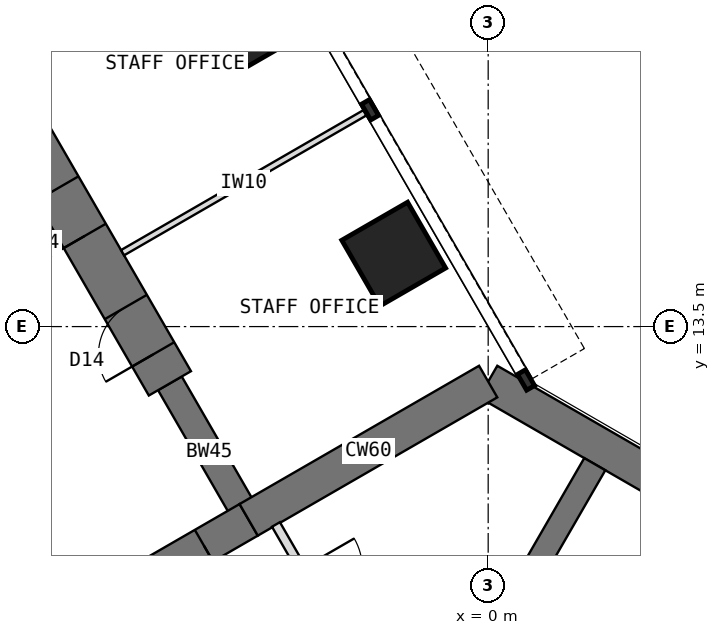
"""IFC4 building model, lengths in metres.
Left out: names, types, materials, properties, quantities, classifications, styles, units other than length and angle.
Written with IfcOpenShell. Run it as: python <this file> out.ifc"""

import sys

from ifc_helpers import new_model, si_unit, direction, frame, frame_2d, origin, origin_2d, place, context, subcontext, project, spatial, rectangle, extrude, element, fill, save


model = new_model("IFC4")
c1 = context("Model", 3, precision=1e-05, world=origin(), true_north=direction((0.0, 1.0)))
c2 = subcontext(c1, "Body", "Model", "MODEL_VIEW")
j1 = project(units=[si_unit("LENGTHUNIT", "METRE"), si_unit("PLANEANGLEUNIT", "RADIAN")], contexts=[c1])
p1 = place(None, origin())
s1 = spatial("IfcSite", under=j1, at=p1, CompositionType="ELEMENT")
p2 = place(p1, origin())
s2 = spatial("IfcBuilding", under=s1, at=p2, CompositionType="ELEMENT")
p3 = place(p2, frame((0.0, 0.0, 161.5)))
s3 = spatial("IfcBuildingStorey", under=s2, at=p3, CompositionType="ELEMENT", Elevation=161.5)
p4 = place(p3, frame((10.908, 6.298, 0.0), z_axis=(0.0, 0.0, 1.0), x_axis=(-0.866021940709, 0.500005998175, 0.0)))
e1 = element("IfcWall", 1, at=p4, inside=s3, PredefinedType="SHEAR", context=c2, shape_type="SweptSolid", body=[
    extrude(rectangle(XDim=12.596, YDim=0.6, at=frame_2d((6.298, 0.0))), origin(), (0.0, 0.0, 1.0), 4.0),
])
p5 = place(p3, frame((0.0, 12.596, 0.0), z_axis=(0.0, 0.0, 1.0), x_axis=(-0.866011268655, -0.500024481964, 0.0)))
e2 = element("IfcWall", 2, at=p5, inside=s3, PredefinedType="SHEAR", context=c2, shape_type="SweptSolid", body=[
    extrude(rectangle(XDim=4.548, YDim=0.6, at=frame_2d((2.274, 0.0))), origin(), (0.0, 0.0, 1.0), 4.0),
])
p6 = place(p3, frame((-3.939, 10.322, 0.0), z_axis=(0.0, 0.0, 1.0), x_axis=(-0.866019471182, -0.500010275428, 0.0)))
e3 = element("IfcWall", 3, at=p6, inside=s3, PredefinedType="SHEAR", context=c2, shape_type="SweptSolid", body=[
    extrude(rectangle(XDim=3.5, YDim=0.6, at=frame_2d((1.75, 0.0))), origin(), (0.0, 0.0, 1.0), 4.0),
])
p7 = place(p6, frame((0.85, 0.0, 0.0)))
e4 = element("IfcOpeningElement", 4, at=p7, cuts=e3, PredefinedType="OPENING", context=c2, shape_type="SweptSolid", body=[
    extrude(rectangle(XDim=1.8, YDim=2.1, at=frame_2d((0.9, 1.05))), frame((0.0, 0.31, 0.0), z_axis=(0.0, -1.0, 0.0), x_axis=(1.0, 0.0, 0.0)), (0.0, 0.0, 1.0), 0.62),
])
for number, where, z_axis, x_axis in (
    (5, (-6.97, 8.572, 0.0), (0.0, 0.0, 1.0), (-0.5, 0.866, 0.0)),
    (6, (-3.939, 10.322, 0.0), (0.0, 0.0, 1.0), (-0.5, 0.866, 0.0)),
):
    element("IfcWall", number, at=place(p3, frame(where, z_axis=z_axis, x_axis=x_axis)), inside=s3, PredefinedType="SHEAR", context=c2, shape_type="SweptSolid", body=[
        extrude(rectangle(XDim=2.592, YDim=0.45, at=frame_2d((1.296, 0.0))), origin(), (0.0, 0.0, 1.0), 4.0),
    ])
p8 = place(p3, frame((-5.234, 12.566, 0.0), z_axis=(0.0, 0.0, 1.0), x_axis=(-0.500010103361, 0.866019570528, 0.0)))
e7 = element("IfcWall", 7, at=p8, inside=s3, PredefinedType="SHEAR", context=c2, shape_type="SweptSolid", body=[
    extrude(rectangle(XDim=13.2, YDim=0.8, at=frame_2d((6.6, 0.0))), origin(), (0.0, 0.0, 1.0), 4.0),
])
p9 = place(p8, frame((0.55, 0.0, 0.0)))
e8 = element("IfcOpeningElement", 8, at=p9, cuts=e7, PredefinedType="OPENING", context=c2, shape_type="SweptSolid", body=[
    extrude(rectangle(XDim=0.9, YDim=2.1, at=frame_2d((0.45, 1.05))), frame((0.0, 0.41, 0.0), z_axis=(0.0, -1.0, 0.0), x_axis=(1.0, 0.0, 0.0)), (0.0, 0.0, 1.0), 0.82),
])
p10 = place(p8, frame((2.8, 0.0, 0.0)))
e9 = element("IfcOpeningElement", 9, at=p10, cuts=e7, PredefinedType="OPENING", context=c2, shape_type="SweptSolid", body=[
    extrude(rectangle(XDim=0.9, YDim=2.1, at=frame_2d((0.45, 1.05))), frame((0.0, 0.41, 0.0), z_axis=(0.0, -1.0, 0.0), x_axis=(1.0, 0.0, 0.0)), (0.0, 0.0, 1.0), 0.82),
])
p11 = place(p8, frame((7.3, 0.0, 0.0)))
e10 = element("IfcOpeningElement", 10, at=p11, cuts=e7, PredefinedType="OPENING", context=c2, shape_type="SweptSolid", body=[
    extrude(rectangle(XDim=0.9, YDim=2.1, at=frame_2d((0.45, 1.05))), frame((0.0, 0.41, 0.0), z_axis=(0.0, -1.0, 0.0), x_axis=(1.0, 0.0, 0.0)), (0.0, 0.0, 1.0), 0.82),
])
for number, where, z_axis, x_axis in (
    (11, (-1.554, 14.691, 0.0), (0.0, 0.0, 1.0), (0.866, 0.5, 0.0)),
    (12, (-3.804, 18.588, 0.0), (0.0, 0.0, 1.0), (0.866, 0.5, 0.0)),
):
    element("IfcColumn", number, at=place(p3, frame(where, z_axis=z_axis, x_axis=x_axis)), inside=s3, PredefinedType="COLUMN", context=c2, shape_type="SweptSolid", body=[
        extrude(rectangle(XDim=1.25, YDim=1.25, at=origin_2d()), origin(), (0.0, 0.0, 1.0), 4.0),
    ])
p12 = place(p3, frame((-1.201, 6.12, 0.0), z_axis=(0.0, 0.0, 1.0), x_axis=(0.49999668571, 0.866027317282, 0.0)))
e13 = element("IfcWall", 13, at=p12, inside=s3, PredefinedType="SHEAR", context=c2, shape_type="SweptSolid", body=[
    extrude(rectangle(XDim=5.908, YDim=0.4, at=frame_2d((2.954, 0.0))), origin(), (0.0, 0.0, 1.0), 4.0),
])
p13 = place(p3, frame((-6.013, 14.715, 0.0), z_axis=(0.0, 0.0, 1.0), x_axis=(0.866016770315, 0.500014953309, 0.0)))
e14 = element("IfcWall", 14, at=p13, inside=s3, PredefinedType="PARTITIONING", context=c2, shape_type="SweptSolid", body=[
    extrude(rectangle(XDim=4.6, YDim=0.1, at=frame_2d((2.3, 0.0))), origin(), (0.0, 0.0, 1.0), 3.7),
])
p14 = place(p3, frame((-3.49, 10.246, 0.0), z_axis=(0.0, 0.0, 1.0), x_axis=(0.499999473313, -0.866025707867, 0.0)))
e15 = element("IfcWall", 15, at=p14, inside=s3, PredefinedType="PARTITIONING", context=c2, shape_type="SweptSolid", body=[
    extrude(rectangle(XDim=4.476, YDim=0.15, at=frame_2d((2.238, 0.0))), origin(), (0.0, 0.0, 1.0), 3.7),
])
p15 = place(p14, frame((0.843, 0.0, 0.0)))
e16 = element("IfcOpeningElement", 16, at=p15, cuts=e15, PredefinedType="OPENING", context=c2, shape_type="SweptSolid", body=[
    extrude(rectangle(XDim=1.0, YDim=2.1, at=frame_2d((0.5, 1.05))), frame((0.0, 0.085, 0.0), z_axis=(0.0, -1.0, 0.0), x_axis=(1.0, 0.0, 0.0)), (0.0, 0.0, 1.0), 0.17),
])
p16 = place(p7, origin())
e17 = element("IfcDoor", 17, at=p16, inside=s3, OperationType="DOUBLE_DOOR_DOUBLE_SWING", PredefinedType="DOOR", context=c2, shape_type="SweptSolid", body=[
    extrude(rectangle(XDim=1.72, YDim=2.06, at=frame_2d((0.9, 1.03))), frame((0.0, 0.025, 0.0), z_axis=(0.0, -1.0, 0.0), x_axis=(1.0, 0.0, 0.0)), (0.0, 0.0, 1.0), 0.05),
    extrude(rectangle(XDim=0.04, YDim=2.1, at=frame_2d((0.02, 1.05))), frame((0.0, 0.3, 0.0), z_axis=(0.0, -1.0, 0.0), x_axis=(1.0, 0.0, 0.0)), (0.0, 0.0, 1.0), 0.6),
    extrude(rectangle(XDim=0.04, YDim=2.1, at=frame_2d((1.78, 1.05))), frame((0.0, 0.3, 0.0), z_axis=(0.0, -1.0, 0.0), x_axis=(1.0, 0.0, 0.0)), (0.0, 0.0, 1.0), 0.6),
    extrude(rectangle(XDim=1.72, YDim=0.04, at=frame_2d((0.9, 2.08))), frame((0.0, 0.3, 0.0), z_axis=(0.0, -1.0, 0.0), x_axis=(1.0, 0.0, 0.0)), (0.0, 0.0, 1.0), 0.6),
])
fill(e4, e17)
p17 = place(p9, origin())
e18 = element("IfcDoor", 18, at=p17, inside=s3, OperationType="SINGLE_SWING_LEFT", PredefinedType="DOOR", context=c2, shape_type="SweptSolid", body=[
    extrude(rectangle(XDim=0.82, YDim=2.06, at=frame_2d((0.45, 1.03))), frame((0.0, 0.025, 0.0), z_axis=(0.0, -1.0, 0.0), x_axis=(1.0, 0.0, 0.0)), (0.0, 0.0, 1.0), 0.05),
    extrude(rectangle(XDim=0.04, YDim=2.1, at=frame_2d((0.02, 1.05))), frame((0.0, 0.4, 0.0), z_axis=(0.0, -1.0, 0.0), x_axis=(1.0, 0.0, 0.0)), (0.0, 0.0, 1.0), 0.8),
    extrude(rectangle(XDim=0.04, YDim=2.1, at=frame_2d((0.88, 1.05))), frame((0.0, 0.4, 0.0), z_axis=(0.0, -1.0, 0.0), x_axis=(1.0, 0.0, 0.0)), (0.0, 0.0, 1.0), 0.8),
    extrude(rectangle(XDim=0.82, YDim=0.04, at=frame_2d((0.45, 2.08))), frame((0.0, 0.4, 0.0), z_axis=(0.0, -1.0, 0.0), x_axis=(1.0, 0.0, 0.0)), (0.0, 0.0, 1.0), 0.8),
])
fill(e8, e18)
p18 = place(p10, origin())
e19 = element("IfcDoor", 19, at=p18, inside=s3, OperationType="SINGLE_SWING_LEFT", PredefinedType="DOOR", context=c2, shape_type="SweptSolid", body=[
    extrude(rectangle(XDim=0.82, YDim=2.06, at=frame_2d((0.45, 1.03))), frame((0.0, 0.025, 0.0), z_axis=(0.0, -1.0, 0.0), x_axis=(1.0, 0.0, 0.0)), (0.0, 0.0, 1.0), 0.05),
    extrude(rectangle(XDim=0.04, YDim=2.1, at=frame_2d((0.02, 1.05))), frame((0.0, 0.4, 0.0), z_axis=(0.0, -1.0, 0.0), x_axis=(1.0, 0.0, 0.0)), (0.0, 0.0, 1.0), 0.8),
    extrude(rectangle(XDim=0.04, YDim=2.1, at=frame_2d((0.88, 1.05))), frame((0.0, 0.4, 0.0), z_axis=(0.0, -1.0, 0.0), x_axis=(1.0, 0.0, 0.0)), (0.0, 0.0, 1.0), 0.8),
    extrude(rectangle(XDim=0.82, YDim=0.04, at=frame_2d((0.45, 2.08))), frame((0.0, 0.4, 0.0), z_axis=(0.0, -1.0, 0.0), x_axis=(1.0, 0.0, 0.0)), (0.0, 0.0, 1.0), 0.8),
])
fill(e9, e19)
save(model, sys.argv[1])
